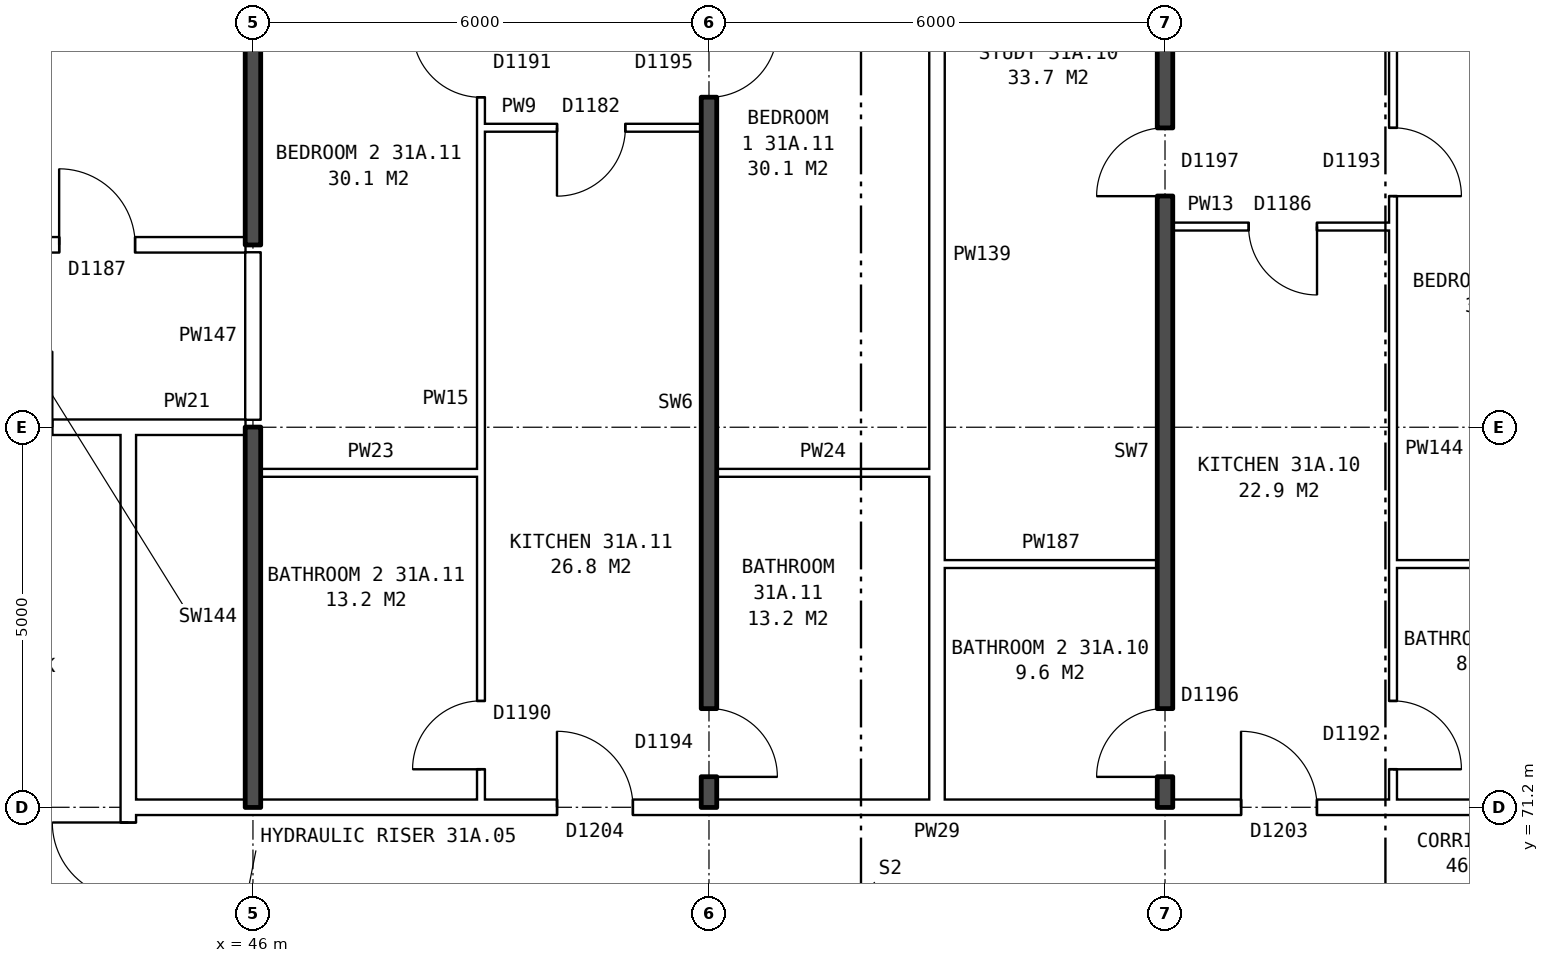
"""IFC4 building model, lengths in metres.
Left out: names, types, materials, properties, quantities, classifications, styles, units other than length and angle.
Written with IfcOpenShell. Run it as: python <this file> out.ifc"""

import sys

from ifc_helpers import new_model, si_unit, direction, frame, frame_2d, origin, place, context, subcontext, project, spatial, rectangle, extrude, element, fill, save


model = new_model("IFC4")
c1 = context("Model", 3, precision=1e-05, world=origin(), true_north=direction((0.0, 1.0)))
c2 = subcontext(c1, "Body", "Model", "MODEL_VIEW")
j1 = project(units=[si_unit("LENGTHUNIT", "METRE"), si_unit("PLANEANGLEUNIT", "RADIAN")], contexts=[c1])
p1 = place(None, origin())
s1 = spatial("IfcSite", under=j1, at=p1, CompositionType="ELEMENT")
p2 = place(p1, origin())
s2 = spatial("IfcBuilding", under=s1, at=p2, CompositionType="ELEMENT")
p3 = place(p2, frame((0.0, 0.0, 111.9)))
s3 = spatial("IfcBuildingStorey", under=s2, at=p3, CompositionType="ELEMENT", Elevation=111.9)
p4 = place(p3, frame((44.36, 63.9, 0.0), z_axis=(0.0, 0.0, 1.0), x_axis=(0.0, 1.0, 0.0)))
e1 = element("IfcWall", 1, at=p4, inside=s3, PredefinedType="PARTITIONING", context=c2, shape_type="SweptSolid", body=[
    extrude(rectangle(XDim=12.2, YDim=0.2, at=frame_2d((6.1, 0.0))), origin(), (0.0, 0.0, 1.0), 2.85),
])
p5 = place(p4, frame((5.1, 0.0, 0.0)))
e2 = element("IfcOpeningElement", 2, at=p5, cuts=e1, PredefinedType="OPENING", context=c2, shape_type="SweptSolid", body=[
    extrude(rectangle(XDim=2.0, YDim=2.1, at=frame_2d((1.0, 1.05))), frame((0.0, 0.11, 0.0), z_axis=(0.0, -1.0, 0.0), x_axis=(1.0, 0.0, 0.0)), (0.0, 0.0, 1.0), 0.22),
])
p6 = place(p3, frame((44.36, 71.2, 0.0), z_axis=(0.0, 0.0, 1.0), x_axis=(1.0, 0.0, 0.0)))
e3 = element("IfcWall", 3, at=p6, inside=s3, PredefinedType="PARTITIONING", context=c2, shape_type="SweptSolid", body=[
    extrude(rectangle(XDim=19.28, YDim=0.2, at=frame_2d((9.64, 0.0))), origin(), (0.0, 0.0, 1.0), 2.85),
])
p7 = place(p6, frame((14.64, 0.0, 0.0)))
e4 = element("IfcOpeningElement", 4, at=p7, cuts=e3, PredefinedType="OPENING", context=c2, shape_type="SweptSolid", body=[
    extrude(rectangle(XDim=1.0, YDim=2.1, at=frame_2d((0.5, 1.05))), frame((0.0, 0.11, 0.0), z_axis=(0.0, -1.0, 0.0), x_axis=(1.0, 0.0, 0.0)), (0.0, 0.0, 1.0), 0.22),
])
p8 = place(p6, frame((5.64, 0.0, 0.0)))
e5 = element("IfcOpeningElement", 5, at=p8, cuts=e3, PredefinedType="OPENING", context=c2, shape_type="SweptSolid", body=[
    extrude(rectangle(XDim=1.0, YDim=2.1, at=frame_2d((0.5, 1.05))), frame((0.0, 0.11, 0.0), z_axis=(0.0, -1.0, 0.0), x_axis=(1.0, 0.0, 0.0)), (0.0, 0.0, 1.0), 0.22),
])
p9 = place(p3, frame((55.1, 74.4, 0.0), z_axis=(0.0, 0.0, 1.0), x_axis=(1.0, 0.0, 0.0)))
e6 = element("IfcWall", 6, at=p9, inside=s3, PredefinedType="PARTITIONING", context=c2, shape_type="SweptSolid", body=[
    extrude(rectangle(XDim=2.8, YDim=0.1, at=frame_2d((1.4, 0.0))), origin(), (0.0, 0.0, 1.0), 2.85),
])
p10 = place(p3, frame((61.0, 74.4, 0.0), z_axis=(0.0, 0.0, 1.0), x_axis=(1.0, 0.0, 0.0)))
e7 = element("IfcWall", 7, at=p10, inside=s3, PredefinedType="PARTITIONING", context=c2, shape_type="SweptSolid", body=[
    extrude(rectangle(XDim=2.64, YDim=0.1, at=frame_2d((1.32, 0.0))), origin(), (0.0, 0.0, 1.0), 2.85),
])
p11 = place(p3, frame((46.1, 75.6, 0.0), z_axis=(0.0, 0.0, 1.0), x_axis=(1.0, 0.0, 0.0)))
e8 = element("IfcWall", 8, at=p11, inside=s3, PredefinedType="PARTITIONING", context=c2, shape_type="SweptSolid", body=[
    extrude(rectangle(XDim=2.9, YDim=0.1, at=frame_2d((1.45, 0.0))), origin(), (0.0, 0.0, 1.0), 2.85),
])
p12 = place(p3, frame((52.1, 75.6, 0.0), z_axis=(0.0, 0.0, 1.0), x_axis=(1.0, 0.0, 0.0)))
e9 = element("IfcWall", 9, at=p12, inside=s3, PredefinedType="PARTITIONING", context=c2, shape_type="SweptSolid", body=[
    extrude(rectangle(XDim=2.8, YDim=0.1, at=frame_2d((1.4, 0.0))), origin(), (0.0, 0.0, 1.0), 2.85),
])
p13 = place(p3, frame((41.36, 76.2, 0.0), z_axis=(0.0, 0.0, 1.0), x_axis=(1.0, 0.0, 0.0)))
e10 = element("IfcWall", 10, at=p13, inside=s3, PredefinedType="PARTITIONING", context=c2, shape_type="SweptSolid", body=[
    extrude(rectangle(XDim=3.0, YDim=0.2, at=frame_2d((1.5, 0.0))), origin(), (0.0, 0.0, 1.0), 2.85),
])
p14 = place(p13, frame((1.0, 0.0, 0.0)))
e11 = element("IfcOpeningElement", 11, at=p14, cuts=e10, PredefinedType="OPENING", context=c2, shape_type="SweptSolid", body=[
    extrude(rectangle(XDim=1.0, YDim=2.1, at=frame_2d((0.5, 1.05))), frame((0.0, 0.11, 0.0), z_axis=(0.0, -1.0, 0.0), x_axis=(1.0, 0.0, 0.0)), (0.0, 0.0, 1.0), 0.22),
])
p15 = place(p3, frame((44.36, 76.2, 0.0), z_axis=(0.0, 0.0, 1.0), x_axis=(1.0, 0.0, 0.0)))
e12 = element("IfcWall", 12, at=p15, inside=s3, PredefinedType="PARTITIONING", context=c2, shape_type="SweptSolid", body=[
    extrude(rectangle(XDim=1.54, YDim=0.2, at=frame_2d((0.77, 0.0))), origin(), (0.0, 0.0, 1.0), 2.85),
])
p16 = place(p3, frame((25.36, 78.6, 0.0), z_axis=(0.0, 0.0, 1.0), x_axis=(1.0, 0.0, 0.0)))
e13 = element("IfcWall", 13, at=p16, inside=s3, PredefinedType="PARTITIONING", context=c2, shape_type="SweptSolid", body=[
    extrude(rectangle(XDim=20.54, YDim=0.2, at=frame_2d((10.27, 0.0))), origin(), (0.0, 0.0, 1.0), 2.85),
])
p17 = place(p16, frame((18.09, 0.0, 0.0)))
e14 = element("IfcOpeningElement", 14, at=p17, cuts=e13, PredefinedType="OPENING", context=c2, shape_type="SweptSolid", body=[
    extrude(rectangle(XDim=1.0, YDim=2.1, at=frame_2d((0.5, 1.05))), frame((0.0, 0.11, 0.0), z_axis=(0.0, -1.0, 0.0), x_axis=(1.0, 0.0, 0.0)), (0.0, 0.0, 1.0), 0.22),
])
p18 = place(p16, frame((12.14, 0.0, 0.0)))
e15 = element("IfcOpeningElement", 15, at=p18, cuts=e13, PredefinedType="OPENING", context=c2, shape_type="SweptSolid", body=[
    extrude(rectangle(XDim=1.0, YDim=2.1, at=frame_2d((0.5, 1.05))), frame((0.0, 0.11, 0.0), z_axis=(0.0, -1.0, 0.0), x_axis=(1.0, 0.0, 0.0)), (0.0, 0.0, 1.0), 0.22),
])
p19 = place(p16, frame((6.34, 0.0, 0.0)))
e16 = element("IfcOpeningElement", 16, at=p19, cuts=e13, PredefinedType="OPENING", context=c2, shape_type="SweptSolid", body=[
    extrude(rectangle(XDim=1.0, YDim=2.1, at=frame_2d((0.5, 1.05))), frame((0.0, 0.11, 0.0), z_axis=(0.0, -1.0, 0.0), x_axis=(1.0, 0.0, 0.0)), (0.0, 0.0, 1.0), 0.22),
])
p20 = place(p3, frame((58.1, 78.84, 0.0), z_axis=(0.0, 0.0, 1.0), x_axis=(1.0, 0.0, 0.0)))
e17 = element("IfcWall", 17, at=p20, inside=s3, PredefinedType="PARTITIONING", context=c2, shape_type="SweptSolid", body=[
    extrude(rectangle(XDim=2.9, YDim=0.1, at=frame_2d((1.45, 0.0))), origin(), (0.0, 0.0, 1.0), 2.85),
])
p21 = place(p20, frame((1.0, 0.0, 0.0)))
e18 = element("IfcOpeningElement", 18, at=p21, cuts=e17, PredefinedType="OPENING", context=c2, shape_type="SweptSolid", body=[
    extrude(rectangle(XDim=0.9, YDim=2.1, at=frame_2d((0.45, 1.05))), frame((0.0, 0.06, 0.0), z_axis=(0.0, -1.0, 0.0), x_axis=(1.0, 0.0, 0.0)), (0.0, 0.0, 1.0), 0.12),
])
p22 = place(p3, frame((49.0, 80.14, 0.0), z_axis=(0.0, 0.0, 1.0), x_axis=(1.0, 0.0, 0.0)))
e19 = element("IfcWall", 19, at=p22, inside=s3, PredefinedType="PARTITIONING", context=c2, shape_type="SweptSolid", body=[
    extrude(rectangle(XDim=2.9, YDim=0.1, at=frame_2d((1.45, 0.0))), origin(), (0.0, 0.0, 1.0), 2.85),
])
p23 = place(p22, frame((1.0, 0.0, 0.0)))
e20 = element("IfcOpeningElement", 20, at=p23, cuts=e19, PredefinedType="OPENING", context=c2, shape_type="SweptSolid", body=[
    extrude(rectangle(XDim=0.9, YDim=2.1, at=frame_2d((0.45, 1.05))), frame((0.0, 0.06, 0.0), z_axis=(0.0, -1.0, 0.0), x_axis=(1.0, 0.0, 0.0)), (0.0, 0.0, 1.0), 0.12),
])
p24 = place(p3, frame((46.0, 71.2, 0.0), z_axis=(0.0, 0.0, 1.0), x_axis=(0.0, 1.0, 0.0)))
e21 = element("IfcWall", 21, at=p24, inside=s3, PredefinedType="SOLIDWALL", context=c2, shape_type="SweptSolid", body=[
    extrude(rectangle(XDim=5.0, YDim=0.2, at=frame_2d((2.5, 0.0))), origin(), (0.0, 0.0, 1.0), 2.85),
])
p25 = place(p3, frame((46.0, 76.3, 0.0), z_axis=(0.0, 0.0, 1.0), x_axis=(0.0, 1.0, 0.0)))
e22 = element("IfcWall", 22, at=p25, inside=s3, PredefinedType="PARTITIONING", context=c2, shape_type="SweptSolid", body=[
    extrude(rectangle(XDim=2.2, YDim=0.2, at=frame_2d((1.1, 0.0))), origin(), (0.0, 0.0, 1.0), 2.85),
])
p26 = place(p3, frame((46.0, 78.6, 0.0), z_axis=(0.0, 0.0, 1.0), x_axis=(0.0, 1.0, 0.0)))
e23 = element("IfcWall", 23, at=p26, inside=s3, PredefinedType="SOLIDWALL", context=c2, shape_type="SweptSolid", body=[
    extrude(rectangle(XDim=7.04, YDim=0.2, at=frame_2d((3.52, 0.0))), origin(), (0.0, 0.0, 1.0), 2.85),
])
p27 = place(p3, frame((49.0, 71.3, 0.0), z_axis=(0.0, 0.0, 1.0), x_axis=(0.0, 1.0, 0.0)))
e24 = element("IfcWall", 24, at=p27, inside=s3, PredefinedType="PARTITIONING", context=c2, shape_type="SweptSolid", body=[
    extrude(rectangle(XDim=14.34, YDim=0.1, at=frame_2d((7.17, 0.0))), origin(), (0.0, 0.0, 1.0), 2.85),
])
p28 = place(p27, frame((9.24, 0.0, 0.0)))
e25 = element("IfcOpeningElement", 25, at=p28, cuts=e24, PredefinedType="OPENING", context=c2, shape_type="SweptSolid", body=[
    extrude(rectangle(XDim=0.9, YDim=2.1, at=frame_2d((0.45, 1.05))), frame((0.0, 0.06, 0.0), z_axis=(0.0, -1.0, 0.0), x_axis=(1.0, 0.0, 0.0)), (0.0, 0.0, 1.0), 0.12),
])
p29 = place(p27, frame((0.4, 0.0, 0.0)))
e26 = element("IfcOpeningElement", 26, at=p29, cuts=e24, PredefinedType="OPENING", context=c2, shape_type="SweptSolid", body=[
    extrude(rectangle(XDim=0.9, YDim=2.1, at=frame_2d((0.45, 1.05))), frame((0.0, 0.06, 0.0), z_axis=(0.0, -1.0, 0.0), x_axis=(1.0, 0.0, 0.0)), (0.0, 0.0, 1.0), 0.12),
])
p30 = place(p3, frame((52.0, 71.2, 0.0), z_axis=(0.0, 0.0, 1.0), x_axis=(0.0, 1.0, 0.0)))
e27 = element("IfcWall", 27, at=p30, inside=s3, PredefinedType="SOLIDWALL", context=c2, shape_type="SweptSolid", body=[
    extrude(rectangle(XDim=14.44, YDim=0.2, at=frame_2d((7.22, 0.0))), origin(), (0.0, 0.0, 1.0), 2.85),
])
p31 = place(p30, frame((9.34, 0.0, 0.0)))
e28 = element("IfcOpeningElement", 28, at=p31, cuts=e27, PredefinedType="OPENING", context=c2, shape_type="SweptSolid", body=[
    extrude(rectangle(XDim=0.9, YDim=2.1, at=frame_2d((0.45, 1.05))), frame((0.0, 0.11, 0.0), z_axis=(0.0, -1.0, 0.0), x_axis=(1.0, 0.0, 0.0)), (0.0, 0.0, 1.0), 0.22),
])
p32 = place(p30, frame((0.4, 0.0, 0.0)))
e29 = element("IfcOpeningElement", 29, at=p32, cuts=e27, PredefinedType="OPENING", context=c2, shape_type="SweptSolid", body=[
    extrude(rectangle(XDim=0.9, YDim=2.1, at=frame_2d((0.45, 1.05))), frame((0.0, 0.11, 0.0), z_axis=(0.0, -1.0, 0.0), x_axis=(1.0, 0.0, 0.0)), (0.0, 0.0, 1.0), 0.22),
])
p33 = place(p3, frame((55.0, 71.3, 0.0), z_axis=(0.0, 0.0, 1.0), x_axis=(0.0, 1.0, 0.0)))
e30 = element("IfcWall", 30, at=p33, inside=s3, PredefinedType="PARTITIONING", context=c2, shape_type="SweptSolid", body=[
    extrude(rectangle(XDim=14.34, YDim=0.2, at=frame_2d((7.17, 0.0))), origin(), (0.0, 0.0, 1.0), 2.85),
])
p34 = place(p3, frame((58.0, 71.2, 0.0), z_axis=(0.0, 0.0, 1.0), x_axis=(0.0, 1.0, 0.0)))
e31 = element("IfcWall", 31, at=p34, inside=s3, PredefinedType="SOLIDWALL", context=c2, shape_type="SweptSolid", body=[
    extrude(rectangle(XDim=14.44, YDim=0.2, at=frame_2d((7.22, 0.0))), origin(), (0.0, 0.0, 1.0), 2.85),
])
p35 = place(p34, frame((8.04, 0.0, 0.0)))
e32 = element("IfcOpeningElement", 32, at=p35, cuts=e31, PredefinedType="OPENING", context=c2, shape_type="SweptSolid", body=[
    extrude(rectangle(XDim=0.9, YDim=2.1, at=frame_2d((0.45, 1.05))), frame((0.0, 0.11, 0.0), z_axis=(0.0, -1.0, 0.0), x_axis=(1.0, 0.0, 0.0)), (0.0, 0.0, 1.0), 0.22),
])
p36 = place(p34, frame((0.4, 0.0, 0.0)))
e33 = element("IfcOpeningElement", 33, at=p36, cuts=e31, PredefinedType="OPENING", context=c2, shape_type="SweptSolid", body=[
    extrude(rectangle(XDim=0.9, YDim=2.1, at=frame_2d((0.45, 1.05))), frame((0.0, 0.11, 0.0), z_axis=(0.0, -1.0, 0.0), x_axis=(1.0, 0.0, 0.0)), (0.0, 0.0, 1.0), 0.22),
])
p37 = place(p3, frame((61.0, 71.3, 0.0), z_axis=(0.0, 0.0, 1.0), x_axis=(0.0, 1.0, 0.0)))
e34 = element("IfcWall", 34, at=p37, inside=s3, PredefinedType="PARTITIONING", context=c2, shape_type="SweptSolid", body=[
    extrude(rectangle(XDim=14.34, YDim=0.1, at=frame_2d((7.17, 0.0))), origin(), (0.0, 0.0, 1.0), 2.85),
])
p38 = place(p37, frame((7.94, 0.0, 0.0)))
e35 = element("IfcOpeningElement", 35, at=p38, cuts=e34, PredefinedType="OPENING", context=c2, shape_type="SweptSolid", body=[
    extrude(rectangle(XDim=0.9, YDim=2.1, at=frame_2d((0.45, 1.05))), frame((0.0, 0.06, 0.0), z_axis=(0.0, -1.0, 0.0), x_axis=(1.0, 0.0, 0.0)), (0.0, 0.0, 1.0), 0.12),
])
p39 = place(p37, frame((0.4, 0.0, 0.0)))
e36 = element("IfcOpeningElement", 36, at=p39, cuts=e34, PredefinedType="OPENING", context=c2, shape_type="SweptSolid", body=[
    extrude(rectangle(XDim=0.9, YDim=2.1, at=frame_2d((0.45, 1.05))), frame((0.0, 0.06, 0.0), z_axis=(0.0, -1.0, 0.0), x_axis=(1.0, 0.0, 0.0)), (0.0, 0.0, 1.0), 0.12),
])
p40 = place(p5, origin())
e37 = element("IfcDoor", 37, at=p40, inside=s3, OperationType="DOUBLE_DOOR_SINGLE_SWING", PredefinedType="DOOR", context=c2, shape_type="SweptSolid", body=[
    extrude(rectangle(XDim=2.0, YDim=2.1, at=frame_2d((1.0, 1.05))), frame((0.0, 0.025, 0.0), z_axis=(0.0, -1.0, 0.0), x_axis=(1.0, 0.0, 0.0)), (0.0, 0.0, 1.0), 0.05),
])
fill(e2, e37)
p41 = place(p38, frame((0.9, 0.0, 0.0), z_axis=(0.0, 0.0, 1.0), x_axis=(-1.0, 0.0, 0.0)))
e38 = element("IfcDoor", 38, at=p41, inside=s3, OperationType="SINGLE_SWING_RIGHT", PredefinedType="DOOR", context=c2, shape_type="SweptSolid", body=[
    extrude(rectangle(XDim=0.9, YDim=2.1, at=frame_2d((0.45, 1.05))), frame((0.0, 0.025, 0.0), z_axis=(0.0, -1.0, 0.0), x_axis=(1.0, 0.0, 0.0)), (0.0, 0.0, 1.0), 0.05),
])
fill(e35, e38)
p42 = place(p35, origin())
e39 = element("IfcDoor", 39, at=p42, inside=s3, OperationType="SINGLE_SWING_LEFT", PredefinedType="DOOR", context=c2, shape_type="SweptSolid", body=[
    extrude(rectangle(XDim=0.9, YDim=2.1, at=frame_2d((0.45, 1.05))), frame((0.0, 0.025, 0.0), z_axis=(0.0, -1.0, 0.0), x_axis=(1.0, 0.0, 0.0)), (0.0, 0.0, 1.0), 0.05),
])
fill(e32, e39)
p43 = place(p7, origin())
e40 = element("IfcDoor", 40, at=p43, inside=s3, OperationType="SINGLE_SWING_LEFT", PredefinedType="DOOR", context=c2, shape_type="SweptSolid", body=[
    extrude(rectangle(XDim=1.0, YDim=2.1, at=frame_2d((0.5, 1.05))), frame((0.0, 0.025, 0.0), z_axis=(0.0, -1.0, 0.0), x_axis=(1.0, 0.0, 0.0)), (0.0, 0.0, 1.0), 0.05),
])
fill(e4, e40)
p44 = place(p21, frame((0.9, 0.0, 0.0), z_axis=(0.0, 0.0, 1.0), x_axis=(-1.0, 0.0, 0.0)))
e41 = element("IfcDoor", 41, at=p44, inside=s3, OperationType="SINGLE_SWING_LEFT", PredefinedType="DOOR", context=c2, shape_type="SweptSolid", body=[
    extrude(rectangle(XDim=0.9, YDim=2.1, at=frame_2d((0.45, 1.05))), frame((0.0, 0.025, 0.0), z_axis=(0.0, -1.0, 0.0), x_axis=(1.0, 0.0, 0.0)), (0.0, 0.0, 1.0), 0.05),
])
fill(e18, e41)
p45 = place(p39, frame((0.9, 0.0, 0.0), z_axis=(0.0, 0.0, 1.0), x_axis=(-1.0, 0.0, 0.0)))
e42 = element("IfcDoor", 42, at=p45, inside=s3, OperationType="SINGLE_SWING_RIGHT", PredefinedType="DOOR", context=c2, shape_type="SweptSolid", body=[
    extrude(rectangle(XDim=0.9, YDim=2.1, at=frame_2d((0.45, 1.05))), frame((0.0, 0.025, 0.0), z_axis=(0.0, -1.0, 0.0), x_axis=(1.0, 0.0, 0.0)), (0.0, 0.0, 1.0), 0.05),
])
fill(e36, e42)
p46 = place(p36, origin())
e43 = element("IfcDoor", 43, at=p46, inside=s3, OperationType="SINGLE_SWING_LEFT", PredefinedType="DOOR", context=c2, shape_type="SweptSolid", body=[
    extrude(rectangle(XDim=0.9, YDim=2.1, at=frame_2d((0.45, 1.05))), frame((0.0, 0.025, 0.0), z_axis=(0.0, -1.0, 0.0), x_axis=(1.0, 0.0, 0.0)), (0.0, 0.0, 1.0), 0.05),
])
fill(e33, e43)
p47 = place(p31, frame((0.9, 0.0, 0.0), z_axis=(0.0, 0.0, 1.0), x_axis=(-1.0, 0.0, 0.0)))
e44 = element("IfcDoor", 44, at=p47, inside=s3, OperationType="SINGLE_SWING_LEFT", PredefinedType="DOOR", context=c2, shape_type="SweptSolid", body=[
    extrude(rectangle(XDim=0.9, YDim=2.1, at=frame_2d((0.45, 1.05))), frame((0.0, 0.025, 0.0), z_axis=(0.0, -1.0, 0.0), x_axis=(1.0, 0.0, 0.0)), (0.0, 0.0, 1.0), 0.05),
])
fill(e28, e44)
p48 = place(p28, origin())
e45 = element("IfcDoor", 45, at=p48, inside=s3, OperationType="SINGLE_SWING_RIGHT", PredefinedType="DOOR", context=c2, shape_type="SweptSolid", body=[
    extrude(rectangle(XDim=0.9, YDim=2.1, at=frame_2d((0.45, 1.05))), frame((0.0, 0.025, 0.0), z_axis=(0.0, -1.0, 0.0), x_axis=(1.0, 0.0, 0.0)), (0.0, 0.0, 1.0), 0.05),
])
fill(e25, e45)
p49 = place(p8, origin())
e46 = element("IfcDoor", 46, at=p49, inside=s3, OperationType="SINGLE_SWING_LEFT", PredefinedType="DOOR", context=c2, shape_type="SweptSolid", body=[
    extrude(rectangle(XDim=1.0, YDim=2.1, at=frame_2d((0.5, 1.05))), frame((0.0, 0.025, 0.0), z_axis=(0.0, -1.0, 0.0), x_axis=(1.0, 0.0, 0.0)), (0.0, 0.0, 1.0), 0.05),
])
fill(e5, e46)
p50 = place(p23, frame((0.9, 0.0, 0.0), z_axis=(0.0, 0.0, 1.0), x_axis=(-1.0, 0.0, 0.0)))
e47 = element("IfcDoor", 47, at=p50, inside=s3, OperationType="SINGLE_SWING_RIGHT", PredefinedType="DOOR", context=c2, shape_type="SweptSolid", body=[
    extrude(rectangle(XDim=0.9, YDim=2.1, at=frame_2d((0.45, 1.05))), frame((0.0, 0.025, 0.0), z_axis=(0.0, -1.0, 0.0), x_axis=(1.0, 0.0, 0.0)), (0.0, 0.0, 1.0), 0.05),
])
fill(e20, e47)
p51 = place(p32, frame((0.9, 0.0, 0.0), z_axis=(0.0, 0.0, 1.0), x_axis=(-1.0, 0.0, 0.0)))
e48 = element("IfcDoor", 48, at=p51, inside=s3, OperationType="SINGLE_SWING_RIGHT", PredefinedType="DOOR", context=c2, shape_type="SweptSolid", body=[
    extrude(rectangle(XDim=0.9, YDim=2.1, at=frame_2d((0.45, 1.05))), frame((0.0, 0.025, 0.0), z_axis=(0.0, -1.0, 0.0), x_axis=(1.0, 0.0, 0.0)), (0.0, 0.0, 1.0), 0.05),
])
fill(e29, e48)
p52 = place(p29, origin())
e49 = element("IfcDoor", 49, at=p52, inside=s3, OperationType="SINGLE_SWING_LEFT", PredefinedType="DOOR", context=c2, shape_type="SweptSolid", body=[
    extrude(rectangle(XDim=0.9, YDim=2.1, at=frame_2d((0.45, 1.05))), frame((0.0, 0.025, 0.0), z_axis=(0.0, -1.0, 0.0), x_axis=(1.0, 0.0, 0.0)), (0.0, 0.0, 1.0), 0.05),
])
fill(e26, e49)
p53 = place(p17, origin())
e50 = element("IfcDoor", 50, at=p53, inside=s3, OperationType="SINGLE_SWING_LEFT", PredefinedType="DOOR", context=c2, shape_type="SweptSolid", body=[
    extrude(rectangle(XDim=1.0, YDim=2.1, at=frame_2d((0.5, 1.05))), frame((0.0, 0.025, 0.0), z_axis=(0.0, -1.0, 0.0), x_axis=(1.0, 0.0, 0.0)), (0.0, 0.0, 1.0), 0.05),
])
fill(e14, e50)
save(model, sys.argv[1])
